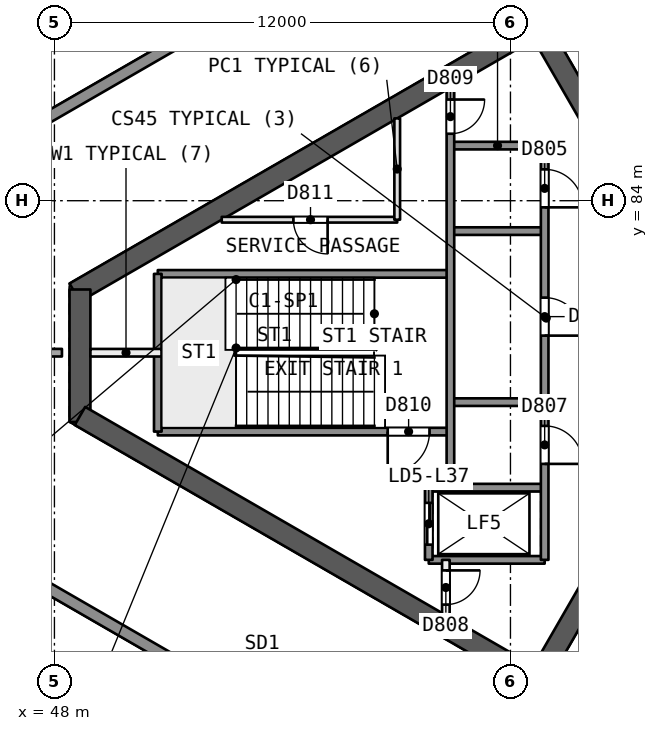
"""IFC4 building model, lengths in metres.
Left out: names, types, materials, properties, quantities, classifications, styles, units other than length and angle.
Written with IfcOpenShell. Run it as: python <this file> out.ifc"""

import sys

from ifc_helpers import new_model, si_unit, direction, frame, frame_2d, origin, place, context, subcontext, project, spatial, rectangle, extrude, element, fill, save


model = new_model("IFC4")
c1 = context("Model", 3, precision=1e-05, world=origin(), true_north=direction((0.0, 1.0)))
c2 = subcontext(c1, "Body", "Model", "MODEL_VIEW")
j1 = project(units=[si_unit("LENGTHUNIT", "METRE"), si_unit("PLANEANGLEUNIT", "RADIAN")], contexts=[c1])
p1 = place(None, origin())
s1 = spatial("IfcSite", under=j1, at=p1, CompositionType="ELEMENT")
p2 = place(p1, origin())
s2 = spatial("IfcBuilding", under=s1, at=p2, CompositionType="ELEMENT")
p3 = place(p2, frame((0.0, 0.0, 156.3)))
s3 = spatial("IfcBuildingStorey", under=s2, at=p3, CompositionType="ELEMENT", Elevation=156.3)
p4 = place(p3, frame((65.682, 80.0, 0.0), z_axis=(0.0, 0.0, 1.0), x_axis=(-0.500000202252, 0.866025287014, 0.0)))
e1 = element("IfcWall", 1, at=p4, inside=s3, PredefinedType="SHEAR", context=c2, shape_type="SweptSolid", body=[
    extrude(rectangle(XDim=10.221, YDim=0.55, at=frame_2d((5.111, 0.0))), origin(), (0.0, 0.0, 1.0), 3.7),
])
p5 = place(p4, frame((0.791, 0.0, 0.0)))
e2 = element("IfcOpeningElement", 2, at=p5, cuts=e1, PredefinedType="OPENING", context=c2, shape_type="SweptSolid", body=[
    extrude(rectangle(XDim=1.2, YDim=2.1, at=frame_2d((0.6, 1.05))), frame((0.0, 0.286, 0.0), z_axis=(0.0, -1.0, 0.0), x_axis=(1.0, 0.0, 0.0)), (0.0, 0.0, 1.0), 0.571),
])
p6 = place(p3, frame((60.709, 88.614, 0.0), z_axis=(0.0, 0.0, 1.0), x_axis=(-0.866020164116, -0.500009075263, 0.0)))
e3 = element("IfcWall", 3, at=p6, inside=s3, PredefinedType="SHEAR", context=c2, shape_type="SweptSolid", body=[
    extrude(rectangle(XDim=14.058, YDim=0.55, at=frame_2d((7.029, 0.0))), origin(), (0.0, 0.0, 1.0), 3.7),
])
p7 = place(p3, frame((48.672, 81.664, 0.0), z_axis=(0.0, 0.0, 1.0), x_axis=(0.0, -1.0, 0.0)))
e4 = element("IfcWall", 4, at=p7, inside=s3, PredefinedType="SHEAR", context=c2, shape_type="SweptSolid", body=[
    extrude(rectangle(XDim=3.487, YDim=0.55, at=frame_2d((1.743, 0.0))), origin(), (0.0, 0.0, 1.0), 3.7),
])
p8 = place(p3, frame((48.672, 78.336, 0.0), z_axis=(0.0, 0.0, 1.0), x_axis=(0.866023530946, -0.500003243837, 0.0)))
e5 = element("IfcWall", 5, at=p8, inside=s3, PredefinedType="SHEAR", context=c2, shape_type="SweptSolid", body=[
    extrude(rectangle(XDim=14.175, YDim=0.55, at=frame_2d((7.087, 0.0))), origin(), (0.0, 0.0, 1.0), 3.7),
])
p9 = place(p3, frame((60.709, 71.386, 0.0), z_axis=(0.0, 0.0, 1.0), x_axis=(0.500015938302, 0.866016201606, 0.0)))
e6 = element("IfcWall", 6, at=p9, inside=s3, PredefinedType="SHEAR", context=c2, shape_type="SweptSolid", body=[
    extrude(rectangle(XDim=10.105, YDim=0.55, at=frame_2d((5.053, 0.0))), origin(), (0.0, 0.0, 1.0), 3.7),
])
p10 = place(p9, frame((7.955, 0.0, 0.0)))
e7 = element("IfcOpeningElement", 7, at=p10, cuts=e6, PredefinedType="OPENING", context=c2, shape_type="SweptSolid", body=[
    extrude(rectangle(XDim=1.2, YDim=2.1, at=frame_2d((0.6, 1.05))), frame((0.0, 0.286, 0.0), z_axis=(0.0, -1.0, 0.0), x_axis=(1.0, 0.0, 0.0)), (0.0, 0.0, 1.0), 0.571),
])
p11 = place(p3, frame((42.077, 80.001, 0.0), z_axis=(0.0, 0.0, 1.0), x_axis=(1.0, 0.0, 0.0)))
e8 = element("IfcWall", 8, at=p11, inside=s3, PredefinedType="PARTITIONING", context=c2, shape_type="SweptSolid", body=[
    extrude(rectangle(XDim=6.121, YDim=0.2, at=frame_2d((3.06, 0.0))), origin(), (0.0, 0.0, 1.0), 3.25),
])
p12 = place(p3, frame((41.928, 82.788, 0.0), z_axis=(0.0, 0.0, 1.0), x_axis=(0.866025629663, 0.499999608766, 0.0)))
e9 = element("IfcWall", 9, at=p12, inside=s3, PredefinedType="SOLIDWALL", context=c2, shape_type="SweptSolid", body=[
    extrude(rectangle(XDim=54.494, YDim=0.3, at=frame_2d((27.247, 0.0))), origin(), (0.0, 0.0, 1.0), 3.25),
])
p13 = place(p12, frame((26.826, 0.0, 0.0)))
e10 = element("IfcOpeningElement", 10, at=p13, cuts=e9, PredefinedType="OPENING", context=c2, shape_type="SweptSolid", body=[
    extrude(rectangle(XDim=2.4, YDim=2.4, at=frame_2d((1.2, 1.2))), frame((0.0, 0.161, 0.0), z_axis=(0.0, -1.0, 0.0), x_axis=(1.0, 0.0, 0.0)), (0.0, 0.0, 1.0), 0.321),
])
p14 = place(p12, frame((31.815, 0.0, 0.0)))
e11 = element("IfcOpeningElement", 11, at=p14, cuts=e9, PredefinedType="OPENING", context=c2, shape_type="SweptSolid", body=[
    extrude(rectangle(XDim=2.4, YDim=2.4, at=frame_2d((1.2, 1.2))), frame((0.0, 0.161, 0.0), z_axis=(0.0, -1.0, 0.0), x_axis=(1.0, 0.0, 0.0)), (0.0, 0.0, 1.0), 0.321),
])
p15 = place(p12, frame((42.339, 0.0, 0.0)))
e12 = element("IfcOpeningElement", 12, at=p15, cuts=e9, PredefinedType="OPENING", context=c2, shape_type="SweptSolid", body=[
    extrude(rectangle(XDim=2.4, YDim=2.4, at=frame_2d((1.2, 1.2))), frame((0.0, 0.161, 0.0), z_axis=(0.0, -1.0, 0.0), x_axis=(1.0, 0.0, 0.0)), (0.0, 0.0, 1.0), 0.321),
])
p16 = place(p12, frame((11.289, 0.0, 0.0)))
e13 = element("IfcOpeningElement", 13, at=p16, cuts=e9, PredefinedType="OPENING", context=c2, shape_type="SweptSolid", body=[
    extrude(rectangle(XDim=2.4, YDim=2.4, at=frame_2d((1.2, 1.2))), frame((0.0, 0.161, 0.0), z_axis=(0.0, -1.0, 0.0), x_axis=(1.0, 0.0, 0.0)), (0.0, 0.0, 1.0), 0.321),
])
p17 = place(p3, frame((89.122, 49.965, 0.0), z_axis=(0.0, 0.0, 1.0), x_axis=(-0.866025629663, 0.499999608766, 0.0)))
e14 = element("IfcWall", 14, at=p17, inside=s3, PredefinedType="SOLIDWALL", context=c2, shape_type="SweptSolid", body=[
    extrude(rectangle(XDim=54.494, YDim=0.3, at=frame_2d((27.247, 0.0))), origin(), (0.0, 0.0, 1.0), 3.25),
])
p18 = place(p17, frame((41.273, 0.0, 0.0)))
e15 = element("IfcOpeningElement", 15, at=p18, cuts=e14, PredefinedType="OPENING", context=c2, shape_type="SweptSolid", body=[
    extrude(rectangle(XDim=2.4, YDim=2.4, at=frame_2d((1.2, 1.2))), frame((0.0, 0.161, 0.0), z_axis=(0.0, -1.0, 0.0), x_axis=(1.0, 0.0, 0.0)), (0.0, 0.0, 1.0), 0.321),
])
p19 = place(p17, frame((11.289, 0.0, 0.0)))
e16 = element("IfcOpeningElement", 16, at=p19, cuts=e14, PredefinedType="OPENING", context=c2, shape_type="SweptSolid", body=[
    extrude(rectangle(XDim=2.4, YDim=2.4, at=frame_2d((1.2, 1.2))), frame((0.0, 0.161, 0.0), z_axis=(0.0, -1.0, 0.0), x_axis=(1.0, 0.0, 0.0)), (0.0, 0.0, 1.0), 0.321),
])
p20 = place(p17, frame((28.14, 0.0, 0.9)))
e17 = element("IfcOpeningElement", 17, at=p20, cuts=e14, PredefinedType="OPENING", context=c2, shape_type="SweptSolid", body=[
    extrude(rectangle(XDim=1.8, YDim=1.5, at=frame_2d((0.9, 0.75))), frame((0.0, 0.161, 0.0), z_axis=(0.0, -1.0, 0.0), x_axis=(1.0, 0.0, 0.0)), (0.0, 0.0, 1.0), 0.321),
])
p21 = place(p17, frame((25.49, 0.0, 0.9)))
e18 = element("IfcOpeningElement", 18, at=p21, cuts=e14, PredefinedType="OPENING", context=c2, shape_type="SweptSolid", body=[
    extrude(rectangle(XDim=1.8, YDim=1.5, at=frame_2d((0.9, 0.75))), frame((0.0, 0.161, 0.0), z_axis=(0.0, -1.0, 0.0), x_axis=(1.0, 0.0, 0.0)), (0.0, 0.0, 1.0), 0.321),
])
p22 = place(p3, frame((60.9, 85.45, 0.0), z_axis=(0.0, 0.0, 1.0), x_axis=(-1.0, 0.0, 0.0)))
e19 = element("IfcWall", 19, at=p22, inside=s3, PredefinedType="SOLIDWALL", context=c2, shape_type="SweptSolid", body=[
    extrude(rectangle(XDim=2.48, YDim=0.2, at=frame_2d((1.24, 0.0))), origin(), (0.0, 0.0, 1.0), 3.25),
])
p23 = place(p3, frame((57.02, 83.5, 0.0), z_axis=(0.0, 0.0, 1.0), x_axis=(-1.0, 0.0, 0.0)))
e20 = element("IfcWall", 20, at=p23, inside=s3, PredefinedType="PARTITIONING", context=c2, shape_type="SweptSolid", body=[
    extrude(rectangle(XDim=4.618, YDim=0.15, at=frame_2d((2.309, 0.0))), origin(), (0.0, 0.0, 1.0), 3.25),
])
p24 = place(p23, frame((1.832, 0.0, 0.0)))
e21 = element("IfcOpeningElement", 21, at=p24, cuts=e20, PredefinedType="OPENING", context=c2, shape_type="SweptSolid", body=[
    extrude(rectangle(XDim=0.9, YDim=2.1, at=frame_2d((0.45, 1.05))), frame((0.0, 0.085, 0.0), z_axis=(0.0, -1.0, 0.0), x_axis=(1.0, 0.0, 0.0)), (0.0, 0.0, 1.0), 0.171),
])
p25 = place(p3, frame((60.9, 83.2, 0.0), z_axis=(0.0, 0.0, 1.0), x_axis=(-1.0, 0.0, 0.0)))
e22 = element("IfcWall", 22, at=p25, inside=s3, PredefinedType="SOLIDWALL", context=c2, shape_type="SweptSolid", body=[
    extrude(rectangle(XDim=2.48, YDim=0.2, at=frame_2d((1.24, 0.0))), origin(), (0.0, 0.0, 1.0), 3.25),
])
p26 = place(p3, frame((58.42, 82.075, 0.0), z_axis=(0.0, 0.0, 1.0), x_axis=(-1.0, 0.0, 0.0)))
e23 = element("IfcWall", 23, at=p26, inside=s3, PredefinedType="SOLIDWALL", context=c2, shape_type="SweptSolid", body=[
    extrude(rectangle(XDim=7.7, YDim=0.2, at=frame_2d((3.85, 0.0))), origin(), (0.0, 0.0, 1.0), 3.25),
])
p27 = place(p3, frame((50.82, 80.0, 0.0), z_axis=(0.0, 0.0, 1.0), x_axis=(-1.0, 0.0, 0.0)))
e24 = element("IfcWall", 24, at=p27, inside=s3, PredefinedType="PARTITIONING", context=c2, shape_type="SweptSolid", body=[
    extrude(rectangle(XDim=1.873, YDim=0.2, at=frame_2d((0.937, 0.0))), origin(), (0.0, 0.0, 1.0), 3.25),
])
p28 = place(p3, frame((60.9, 78.7, 0.0), z_axis=(0.0, 0.0, 1.0), x_axis=(-1.0, 0.0, 0.0)))
e25 = element("IfcWall", 25, at=p28, inside=s3, PredefinedType="SOLIDWALL", context=c2, shape_type="SweptSolid", body=[
    extrude(rectangle(XDim=2.48, YDim=0.2, at=frame_2d((1.24, 0.0))), origin(), (0.0, 0.0, 1.0), 3.25),
])
p29 = place(p3, frame((58.42, 77.925, 0.0), z_axis=(0.0, 0.0, 1.0), x_axis=(-1.0, 0.0, 0.0)))
e26 = element("IfcWall", 26, at=p29, inside=s3, PredefinedType="SOLIDWALL", context=c2, shape_type="SweptSolid", body=[
    extrude(rectangle(XDim=7.7, YDim=0.2, at=frame_2d((3.85, 0.0))), origin(), (0.0, 0.0, 1.0), 3.25),
])
p30 = place(p29, frame((0.55, 0.0, 0.0)))
e27 = element("IfcOpeningElement", 27, at=p30, cuts=e26, PredefinedType="OPENING", context=c2, shape_type="SweptSolid", body=[
    extrude(rectangle(XDim=1.1, YDim=2.1, at=frame_2d((0.55, 1.05))), frame((0.0, 0.11, 0.0), z_axis=(0.0, -1.0, 0.0), x_axis=(1.0, 0.0, 0.0)), (0.0, 0.0, 1.0), 0.221),
])
for number, where, z_axis, x_axis in (
    (28, (60.9, 76.45, 0.0), (0.0, 0.0, 1.0), (-1.0, 0.0, 0.0)),
    (29, (60.9, 74.55, 0.0), (0.0, 0.0, 1.0), (-1.0, 0.0, 0.0)),
):
    element("IfcWall", number, at=place(p3, frame(where, z_axis=z_axis, x_axis=x_axis)), inside=s3, PredefinedType="SOLIDWALL", context=c2, shape_type="SweptSolid", body=[
        extrude(rectangle(XDim=3.05, YDim=0.2, at=frame_2d((1.525, 0.0))), origin(), (0.0, 0.0, 1.0), 3.25),
    ])
p31 = place(p3, frame((60.9, 85.45, 0.0), z_axis=(0.0, 0.0, 1.0), x_axis=(0.0, -1.0, 0.0)))
e30 = element("IfcWall", 30, at=p31, inside=s3, PredefinedType="SOLIDWALL", context=c2, shape_type="SweptSolid", body=[
    extrude(rectangle(XDim=10.9, YDim=0.2, at=frame_2d((5.45, 0.0))), origin(), (0.0, 0.0, 1.0), 3.25),
])
p32 = place(p31, frame((0.625, 0.0, 0.0)))
e31 = element("IfcOpeningElement", 31, at=p32, cuts=e30, PredefinedType="OPENING", context=c2, shape_type="SweptSolid", body=[
    extrude(rectangle(XDim=1.0, YDim=2.1, at=frame_2d((0.5, 1.05))), frame((0.0, 0.11, 0.0), z_axis=(0.0, -1.0, 0.0), x_axis=(1.0, 0.0, 0.0)), (0.0, 0.0, 1.0), 0.221),
])
p33 = place(p31, frame((4.0, 0.0, 0.0)))
e32 = element("IfcOpeningElement", 32, at=p33, cuts=e30, PredefinedType="OPENING", context=c2, shape_type="SweptSolid", body=[
    extrude(rectangle(XDim=1.0, YDim=2.1, at=frame_2d((0.5, 1.05))), frame((0.0, 0.11, 0.0), z_axis=(0.0, -1.0, 0.0), x_axis=(1.0, 0.0, 0.0)), (0.0, 0.0, 1.0), 0.221),
])
p34 = place(p31, frame((7.375, 0.0, 0.0)))
e33 = element("IfcOpeningElement", 33, at=p34, cuts=e30, PredefinedType="OPENING", context=c2, shape_type="SweptSolid", body=[
    extrude(rectangle(XDim=1.0, YDim=2.1, at=frame_2d((0.5, 1.05))), frame((0.0, 0.11, 0.0), z_axis=(0.0, -1.0, 0.0), x_axis=(1.0, 0.0, 0.0)), (0.0, 0.0, 1.0), 0.221),
])
p35 = place(p3, frame((58.42, 86.974, 0.0), z_axis=(0.0, 0.0, 1.0), x_axis=(0.0, -1.0, 0.0)))
e34 = element("IfcWall", 34, at=p35, inside=s3, PredefinedType="SOLIDWALL", context=c2, shape_type="SweptSolid", body=[
    extrude(rectangle(XDim=10.524, YDim=0.2, at=frame_2d((5.262, 0.0))), origin(), (0.0, 0.0, 1.0), 3.25),
])
p36 = place(p35, frame((0.312, 0.0, 0.0)))
e35 = element("IfcOpeningElement", 35, at=p36, cuts=e34, PredefinedType="OPENING", context=c2, shape_type="SweptSolid", body=[
    extrude(rectangle(XDim=0.9, YDim=2.1, at=frame_2d((0.45, 1.05))), frame((0.0, 0.11, 0.0), z_axis=(0.0, -1.0, 0.0), x_axis=(1.0, 0.0, 0.0)), (0.0, 0.0, 1.0), 0.221),
])
p37 = place(p3, frame((58.3, 74.55, 0.0), z_axis=(0.0, 0.0, 1.0), x_axis=(0.0, -1.0, 0.0)))
e36 = element("IfcWall", 36, at=p37, inside=s3, PredefinedType="PARTITIONING", context=c2, shape_type="SweptSolid", body=[
    extrude(rectangle(XDim=1.455, YDim=0.2, at=frame_2d((0.728, 0.0))), origin(), (0.0, 0.0, 1.0), 3.25),
])
p38 = place(p37, frame((0.278, 0.0, 0.0)))
e37 = element("IfcOpeningElement", 37, at=p38, cuts=e36, PredefinedType="OPENING", context=c2, shape_type="SweptSolid", body=[
    extrude(rectangle(XDim=0.9, YDim=2.1, at=frame_2d((0.45, 1.05))), frame((0.0, 0.11, 0.0), z_axis=(0.0, -1.0, 0.0), x_axis=(1.0, 0.0, 0.0)), (0.0, 0.0, 1.0), 0.221),
])
p39 = place(p3, frame((57.85, 76.45, 0.0), z_axis=(0.0, 0.0, 1.0), x_axis=(0.0, -1.0, 0.0)))
e38 = element("IfcWall", 38, at=p39, inside=s3, PredefinedType="SOLIDWALL", context=c2, shape_type="SweptSolid", body=[
    extrude(rectangle(XDim=1.9, YDim=0.2, at=frame_2d((0.95, 0.0))), origin(), (0.0, 0.0, 1.0), 3.25),
])
p40 = place(p39, frame((0.4, 0.0, 0.0)))
e39 = element("IfcOpeningElement", 39, at=p40, cuts=e38, PredefinedType="OPENING", context=c2, shape_type="SweptSolid", body=[
    extrude(rectangle(XDim=1.1, YDim=2.1, at=frame_2d((0.55, 1.05))), frame((0.0, 0.11, 0.0), z_axis=(0.0, -1.0, 0.0), x_axis=(1.0, 0.0, 0.0)), (0.0, 0.0, 1.0), 0.221),
])
p41 = place(p3, frame((57.02, 86.166, 0.0), z_axis=(0.0, 0.0, 1.0), x_axis=(0.0, -1.0, 0.0)))
e40 = element("IfcWall", 40, at=p41, inside=s3, PredefinedType="PARTITIONING", context=c2, shape_type="SweptSolid", body=[
    extrude(rectangle(XDim=2.666, YDim=0.15, at=frame_2d((1.333, 0.0))), origin(), (0.0, 0.0, 1.0), 3.25),
])
p42 = place(p3, frame((50.72, 82.075, 0.0), z_axis=(0.0, 0.0, 1.0), x_axis=(0.0, -1.0, 0.0)))
e41 = element("IfcWall", 41, at=p42, inside=s3, PredefinedType="SOLIDWALL", context=c2, shape_type="SweptSolid", body=[
    extrude(rectangle(XDim=4.15, YDim=0.2, at=frame_2d((2.075, 0.0))), origin(), (0.0, 0.0, 1.0), 3.25),
])
p43 = place(p40, origin())
e42 = element("IfcDoor", 42, at=p43, inside=s3, OperationType="SLIDING_TO_RIGHT", PredefinedType="NOTDEFINED", context=c2, shape_type="SweptSolid", body=[
    extrude(rectangle(XDim=1.1, YDim=2.1, at=frame_2d((0.55, 1.05))), frame((0.0, 0.025, 0.0), z_axis=(0.0, -1.0, 0.0), x_axis=(1.0, 0.0, 0.0)), (0.0, 0.0, 1.0), 0.05),
])
fill(e39, e42)
p44 = place(p32, origin())
e43 = element("IfcDoor", 43, at=p44, inside=s3, OperationType="SINGLE_SWING_RIGHT", PredefinedType="NOTDEFINED", context=c2, shape_type="SweptSolid", body=[
    extrude(rectangle(XDim=1.0, YDim=2.1, at=frame_2d((0.5, 1.05))), frame((0.0, 0.025, 0.0), z_axis=(0.0, -1.0, 0.0), x_axis=(1.0, 0.0, 0.0)), (0.0, 0.0, 1.0), 0.05),
])
fill(e31, e43)
p45 = place(p33, origin())
e44 = element("IfcDoor", 44, at=p45, inside=s3, OperationType="SINGLE_SWING_RIGHT", PredefinedType="NOTDEFINED", context=c2, shape_type="SweptSolid", body=[
    extrude(rectangle(XDim=1.0, YDim=2.1, at=frame_2d((0.5, 1.05))), frame((0.0, 0.025, 0.0), z_axis=(0.0, -1.0, 0.0), x_axis=(1.0, 0.0, 0.0)), (0.0, 0.0, 1.0), 0.05),
])
fill(e32, e44)
p46 = place(p34, origin())
e45 = element("IfcDoor", 45, at=p46, inside=s3, OperationType="SINGLE_SWING_RIGHT", PredefinedType="NOTDEFINED", context=c2, shape_type="SweptSolid", body=[
    extrude(rectangle(XDim=1.0, YDim=2.1, at=frame_2d((0.5, 1.05))), frame((0.0, 0.025, 0.0), z_axis=(0.0, -1.0, 0.0), x_axis=(1.0, 0.0, 0.0)), (0.0, 0.0, 1.0), 0.05),
])
fill(e33, e45)
p47 = place(p38, origin())
e46 = element("IfcDoor", 46, at=p47, inside=s3, OperationType="SINGLE_SWING_LEFT", PredefinedType="NOTDEFINED", context=c2, shape_type="SweptSolid", body=[
    extrude(rectangle(XDim=0.9, YDim=2.1, at=frame_2d((0.45, 1.05))), frame((0.0, 0.025, 0.0), z_axis=(0.0, -1.0, 0.0), x_axis=(1.0, 0.0, 0.0)), (0.0, 0.0, 1.0), 0.05),
])
fill(e37, e46)
p48 = place(p36, origin())
e47 = element("IfcDoor", 47, at=p48, inside=s3, OperationType="SINGLE_SWING_LEFT", PredefinedType="NOTDEFINED", context=c2, shape_type="SweptSolid", body=[
    extrude(rectangle(XDim=0.9, YDim=2.1, at=frame_2d((0.45, 1.05))), frame((0.0, 0.025, 0.0), z_axis=(0.0, -1.0, 0.0), x_axis=(1.0, 0.0, 0.0)), (0.0, 0.0, 1.0), 0.05),
])
fill(e35, e47)
p49 = place(p30, origin())
e48 = element("IfcDoor", 48, at=p49, inside=s3, OperationType="SINGLE_SWING_RIGHT", PredefinedType="NOTDEFINED", context=c2, shape_type="SweptSolid", body=[
    extrude(rectangle(XDim=1.1, YDim=2.1, at=frame_2d((0.55, 1.05))), frame((0.0, 0.025, 0.0), z_axis=(0.0, -1.0, 0.0), x_axis=(1.0, 0.0, 0.0)), (0.0, 0.0, 1.0), 0.05),
])
fill(e27, e48)
p50 = place(p24, origin())
e49 = element("IfcDoor", 49, at=p50, inside=s3, OperationType="SINGLE_SWING_LEFT", PredefinedType="NOTDEFINED", context=c2, shape_type="SweptSolid", body=[
    extrude(rectangle(XDim=0.9, YDim=2.1, at=frame_2d((0.45, 1.05))), frame((0.0, 0.025, 0.0), z_axis=(0.0, -1.0, 0.0), x_axis=(1.0, 0.0, 0.0)), (0.0, 0.0, 1.0), 0.05),
])
fill(e21, e49)
save(model, sys.argv[1])
